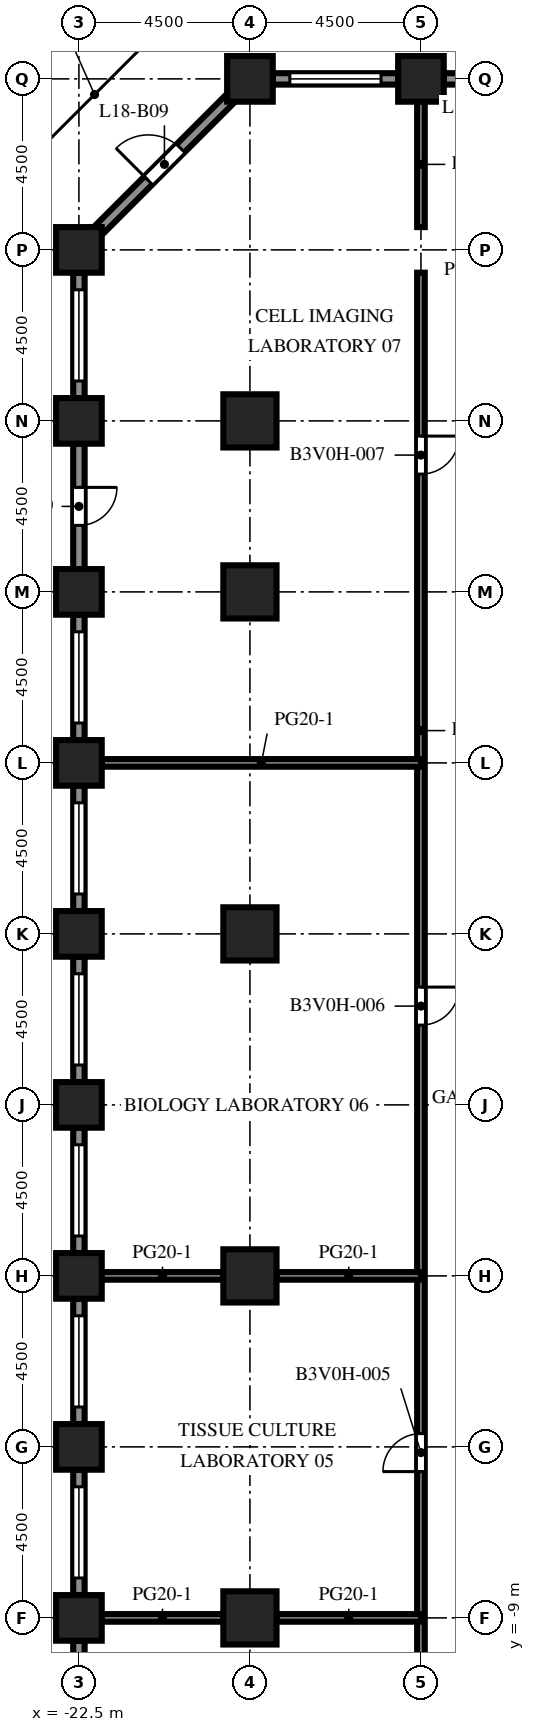
"""IFC4 building model, lengths in metres.
Left out: names, types, materials, properties, quantities, classifications, styles, units other than length and angle.
Written with IfcOpenShell. Run it as: python <this file> out.ifc"""

import sys

from ifc_helpers import new_model, si_unit, direction, frame, frame_2d, origin, origin_2d, place, context, subcontext, project, spatial, rectangle, extrude, element, fill, save


model = new_model("IFC4")
c1 = context("Model", 3, precision=1e-05, world=origin(), true_north=direction((0.0, 1.0)))
c2 = subcontext(c1, "Body", "Model", "MODEL_VIEW")
j1 = project(units=[si_unit("LENGTHUNIT", "METRE"), si_unit("PLANEANGLEUNIT", "RADIAN")], contexts=[c1])
p1 = place(None, origin())
s1 = spatial("IfcSite", under=j1, at=p1, CompositionType="ELEMENT")
p2 = place(p1, origin())
s2 = spatial("IfcBuilding", under=s1, at=p2, CompositionType="ELEMENT")
p3 = place(p2, frame((0.0, 0.0, 82.0)))
s3 = spatial("IfcBuildingStorey", under=s2, at=p3, CompositionType="ELEMENT", Elevation=82.0)
for number, where, z_axis, x_axis in (
    (1, (-22.5, -9.0, 0.0), (0.0, 0.0, 1.0), (1.0, 0.0, 0.0)),
    (2, (-22.5, -4.5, 0.0), (0.0, 0.0, 1.0), (1.0, 0.0, 0.0)),
    (3, (-22.5, 0.0, 0.0), (0.0, 0.0, 1.0), (1.0, 0.0, 0.0)),
    (4, (-22.5, 4.5, 0.0), (0.0, 0.0, 1.0), (1.0, 0.0, 0.0)),
    (5, (-22.5, 9.0, 0.0), (0.0, 0.0, 1.0), (1.0, 0.0, 0.0)),
    (6, (-22.5, 13.5, 0.0), (0.0, 0.0, 1.0), (1.0, 0.0, 0.0)),
    (7, (-22.5, 18.0, 0.0), (0.0, 0.0, 1.0), (1.0, 0.0, 0.0)),
    (8, (-22.5, 22.5, 0.0), (0.0, 0.0, 1.0), (1.0, 0.0, 0.0)),
    (9, (-22.5, 27.0, 0.0), (0.0, 0.0, 1.0), (1.0, 0.0, 0.0)),
):
    element("IfcColumn", number, at=place(p3, frame(where, z_axis=z_axis, x_axis=x_axis)), inside=s3, PredefinedType="COLUMN", context=c2, shape_type="SweptSolid", body=[
        extrude(rectangle(XDim=1.2, YDim=1.2, at=origin_2d()), origin(), (0.0, 0.0, 1.0), 4.1),
    ])
for number, where, z_axis, x_axis in (
    (10, (-18.0, 31.5, -0.45), (0.0, 0.0, 1.0), (1.0, 0.0, 0.0)),
    (11, (-13.5, 31.5, -0.45), (0.0, 0.0, 1.0), (1.0, 0.0, 0.0)),
):
    element("IfcColumn", number, at=place(p3, frame(where, z_axis=z_axis, x_axis=x_axis)), inside=s3, PredefinedType="COLUMN", context=c2, shape_type="SweptSolid", body=[
        extrude(rectangle(XDim=1.2, YDim=1.2, at=origin_2d()), origin(), (0.0, 0.0, 1.0), 4.55),
    ])
for number, where, z_axis, x_axis in (
    (12, (-18.0, -9.0, 0.0), (0.0, 0.0, 1.0), (1.0, 0.0, 0.0)),
    (13, (-18.0, 0.0, 0.0), (0.0, 0.0, 1.0), (1.0, 0.0, 0.0)),
    (14, (-18.0, 9.0, 0.0), (0.0, 0.0, 1.0), (1.0, 0.0, 0.0)),
):
    element("IfcColumn", number, at=place(p3, frame(where, z_axis=z_axis, x_axis=x_axis)), inside=s3, PredefinedType="COLUMN", context=c2, shape_type="SweptSolid", body=[
        extrude(rectangle(XDim=1.4, YDim=1.4, at=origin_2d()), origin(), (0.0, 0.0, 1.0), 4.1),
    ])
for number, where, z_axis, x_axis in (
    (15, (-18.0, 18.0, -0.45), (0.0, 0.0, 1.0), (1.0, 0.0, 0.0)),
    (16, (-18.0, 22.5, -0.45), (0.0, 0.0, 1.0), (1.0, 0.0, 0.0)),
):
    element("IfcColumn", number, at=place(p3, frame(where, z_axis=z_axis, x_axis=x_axis)), inside=s3, PredefinedType="COLUMN", context=c2, shape_type="SweptSolid", body=[
        extrude(rectangle(XDim=1.4, YDim=1.4, at=origin_2d()), origin(), (0.0, 0.0, 1.0), 4.55),
    ])
p4 = place(p3, frame((-12.9, 31.5, 0.0), z_axis=(0.0, 0.0, 1.0), x_axis=(1.0, 0.0, 0.0)))
e17 = element("IfcWall", 17, at=p4, inside=s3, PredefinedType="SOLIDWALL", context=c2, shape_type="SweptSolid", body=[
    extrude(rectangle(XDim=3.3, YDim=0.3, at=frame_2d((1.65, 0.0))), origin(), (0.0, 0.0, 1.0), 2.75),
])
p5 = place(p4, frame((1.15, 0.0, 0.0)))
e18 = element("IfcOpeningElement", 18, at=p5, cuts=e17, PredefinedType="OPENING", context=c2, shape_type="SweptSolid", body=[
    extrude(rectangle(XDim=1.0, YDim=2.2, at=frame_2d((0.5, 1.1))), frame((0.0, 0.16, 0.0), z_axis=(0.0, -1.0, 0.0), x_axis=(1.0, 0.0, 0.0)), (0.0, 0.0, 1.0), 0.32),
])
p6 = place(p3, frame((-17.4, 31.5, 0.0), z_axis=(0.0, 0.0, 1.0), x_axis=(1.0, 0.0, 0.0)))
e19 = element("IfcWall", 19, at=p6, inside=s3, PredefinedType="SOLIDWALL", context=c2, shape_type="SweptSolid", body=[
    extrude(rectangle(XDim=3.3, YDim=0.3, at=frame_2d((1.65, 0.0))), origin(), (0.0, 0.0, 1.0), 2.75),
])
p7 = place(p6, frame((0.45, 0.0, 0.8)))
e20 = element("IfcOpeningElement", 20, at=p7, cuts=e19, PredefinedType="OPENING", context=c2, shape_type="SweptSolid", body=[
    extrude(rectangle(XDim=2.4, YDim=1.7, at=frame_2d((1.2, 0.85))), frame((0.0, 0.16, 0.0), z_axis=(0.0, -1.0, 0.0), x_axis=(1.0, 0.0, 0.0)), (0.0, 0.0, 1.0), 0.32),
])
p8 = place(p3, frame((-22.006, 27.494, 0.0), z_axis=(0.0, 0.0, 1.0), x_axis=(0.707106781187, 0.707106781187, 0.0)))
e21 = element("IfcWall", 21, at=p8, inside=s3, PredefinedType="SOLIDWALL", context=c2, shape_type="SweptSolid", body=[
    extrude(rectangle(XDim=4.967, YDim=0.3, at=frame_2d((2.483, 0.0))), origin(), (0.0, 0.0, 1.0), 2.75),
])
p9 = place(p8, frame((1.884, 0.0, 0.0)))
e22 = element("IfcOpeningElement", 22, at=p9, cuts=e21, PredefinedType="OPENING", context=c2, shape_type="SweptSolid", body=[
    extrude(rectangle(XDim=1.2, YDim=2.2, at=frame_2d((0.6, 1.1))), frame((0.0, 0.16, 0.0), z_axis=(0.0, -1.0, 0.0), x_axis=(1.0, 0.0, 0.0)), (0.0, 0.0, 1.0), 0.32),
])
p10 = place(p3, frame((-22.5, 23.1, 0.0), z_axis=(0.0, 0.0, 1.0), x_axis=(0.0, 1.0, 0.0)))
e23 = element("IfcWall", 23, at=p10, inside=s3, PredefinedType="SOLIDWALL", context=c2, shape_type="SweptSolid", body=[
    extrude(rectangle(XDim=3.3, YDim=0.3, at=frame_2d((1.65, 0.0))), origin(), (0.0, 0.0, 1.0), 2.75),
])
p11 = place(p10, frame((0.45, 0.0, 0.8)))
e24 = element("IfcOpeningElement", 24, at=p11, cuts=e23, PredefinedType="OPENING", context=c2, shape_type="SweptSolid", body=[
    extrude(rectangle(XDim=2.4, YDim=1.7, at=frame_2d((1.2, 0.85))), frame((0.0, 0.16, 0.0), z_axis=(0.0, -1.0, 0.0), x_axis=(1.0, 0.0, 0.0)), (0.0, 0.0, 1.0), 0.32),
])
p12 = place(p3, frame((-22.5, 18.6, 0.0), z_axis=(0.0, 0.0, 1.0), x_axis=(0.0, 1.0, 0.0)))
e25 = element("IfcWall", 25, at=p12, inside=s3, PredefinedType="SOLIDWALL", context=c2, shape_type="SweptSolid", body=[
    extrude(rectangle(XDim=3.3, YDim=0.3, at=frame_2d((1.65, 0.0))), origin(), (0.0, 0.0, 1.0), 2.75),
])
p13 = place(p12, frame((1.15, 0.0, 0.0)))
e26 = element("IfcOpeningElement", 26, at=p13, cuts=e25, PredefinedType="OPENING", context=c2, shape_type="SweptSolid", body=[
    extrude(rectangle(XDim=1.0, YDim=2.2, at=frame_2d((0.5, 1.1))), frame((0.0, 0.16, 0.0), z_axis=(0.0, -1.0, 0.0), x_axis=(1.0, 0.0, 0.0)), (0.0, 0.0, 1.0), 0.32),
])
p14 = place(p3, frame((-22.5, 14.1, 0.0), z_axis=(0.0, 0.0, 1.0), x_axis=(0.0, 1.0, 0.0)))
e27 = element("IfcWall", 27, at=p14, inside=s3, PredefinedType="SOLIDWALL", context=c2, shape_type="SweptSolid", body=[
    extrude(rectangle(XDim=3.3, YDim=0.3, at=frame_2d((1.65, 0.0))), origin(), (0.0, 0.0, 1.0), 2.75),
])
p15 = place(p14, frame((0.45, 0.0, 0.8)))
e28 = element("IfcOpeningElement", 28, at=p15, cuts=e27, PredefinedType="OPENING", context=c2, shape_type="SweptSolid", body=[
    extrude(rectangle(XDim=2.4, YDim=1.7, at=frame_2d((1.2, 0.85))), frame((0.0, 0.16, 0.0), z_axis=(0.0, -1.0, 0.0), x_axis=(1.0, 0.0, 0.0)), (0.0, 0.0, 1.0), 0.32),
])
p16 = place(p3, frame((-22.5, 9.6, 0.0), z_axis=(0.0, 0.0, 1.0), x_axis=(0.0, 1.0, 0.0)))
e29 = element("IfcWall", 29, at=p16, inside=s3, PredefinedType="SOLIDWALL", context=c2, shape_type="SweptSolid", body=[
    extrude(rectangle(XDim=3.3, YDim=0.3, at=frame_2d((1.65, 0.0))), origin(), (0.0, 0.0, 1.0), 2.75),
])
p17 = place(p16, frame((0.45, 0.0, 0.8)))
e30 = element("IfcOpeningElement", 30, at=p17, cuts=e29, PredefinedType="OPENING", context=c2, shape_type="SweptSolid", body=[
    extrude(rectangle(XDim=2.4, YDim=1.7, at=frame_2d((1.2, 0.85))), frame((0.0, 0.16, 0.0), z_axis=(0.0, -1.0, 0.0), x_axis=(1.0, 0.0, 0.0)), (0.0, 0.0, 1.0), 0.32),
])
p18 = place(p3, frame((-22.5, 5.1, 0.0), z_axis=(0.0, 0.0, 1.0), x_axis=(0.0, 1.0, 0.0)))
e31 = element("IfcWall", 31, at=p18, inside=s3, PredefinedType="SOLIDWALL", context=c2, shape_type="SweptSolid", body=[
    extrude(rectangle(XDim=3.3, YDim=0.3, at=frame_2d((1.65, 0.0))), origin(), (0.0, 0.0, 1.0), 2.75),
])
p19 = place(p18, frame((0.45, 0.0, 0.8)))
e32 = element("IfcOpeningElement", 32, at=p19, cuts=e31, PredefinedType="OPENING", context=c2, shape_type="SweptSolid", body=[
    extrude(rectangle(XDim=2.4, YDim=1.7, at=frame_2d((1.2, 0.85))), frame((0.0, 0.16, 0.0), z_axis=(0.0, -1.0, 0.0), x_axis=(1.0, 0.0, 0.0)), (0.0, 0.0, 1.0), 0.32),
])
p20 = place(p3, frame((-22.5, 0.6, 0.0), z_axis=(0.0, 0.0, 1.0), x_axis=(0.0, 1.0, 0.0)))
e33 = element("IfcWall", 33, at=p20, inside=s3, PredefinedType="SOLIDWALL", context=c2, shape_type="SweptSolid", body=[
    extrude(rectangle(XDim=3.3, YDim=0.3, at=frame_2d((1.65, 0.0))), origin(), (0.0, 0.0, 1.0), 2.75),
])
p21 = place(p20, frame((0.45, 0.0, 0.8)))
e34 = element("IfcOpeningElement", 34, at=p21, cuts=e33, PredefinedType="OPENING", context=c2, shape_type="SweptSolid", body=[
    extrude(rectangle(XDim=2.4, YDim=1.7, at=frame_2d((1.2, 0.85))), frame((0.0, 0.16, 0.0), z_axis=(0.0, -1.0, 0.0), x_axis=(1.0, 0.0, 0.0)), (0.0, 0.0, 1.0), 0.32),
])
p22 = place(p3, frame((-22.5, -3.9, 0.0), z_axis=(0.0, 0.0, 1.0), x_axis=(0.0, 1.0, 0.0)))
e35 = element("IfcWall", 35, at=p22, inside=s3, PredefinedType="SOLIDWALL", context=c2, shape_type="SweptSolid", body=[
    extrude(rectangle(XDim=3.3, YDim=0.3, at=frame_2d((1.65, 0.0))), origin(), (0.0, 0.0, 1.0), 2.75),
])
p23 = place(p22, frame((0.45, 0.0, 0.8)))
e36 = element("IfcOpeningElement", 36, at=p23, cuts=e35, PredefinedType="OPENING", context=c2, shape_type="SweptSolid", body=[
    extrude(rectangle(XDim=2.4, YDim=1.7, at=frame_2d((1.2, 0.85))), frame((0.0, 0.16, 0.0), z_axis=(0.0, -1.0, 0.0), x_axis=(1.0, 0.0, 0.0)), (0.0, 0.0, 1.0), 0.32),
])
p24 = place(p3, frame((-22.5, -8.4, 0.0), z_axis=(0.0, 0.0, 1.0), x_axis=(0.0, 1.0, 0.0)))
e37 = element("IfcWall", 37, at=p24, inside=s3, PredefinedType="SOLIDWALL", context=c2, shape_type="SweptSolid", body=[
    extrude(rectangle(XDim=3.3, YDim=0.3, at=frame_2d((1.65, 0.0))), origin(), (0.0, 0.0, 1.0), 2.75),
])
p25 = place(p24, frame((0.45, 0.0, 0.8)))
e38 = element("IfcOpeningElement", 38, at=p25, cuts=e37, PredefinedType="OPENING", context=c2, shape_type="SweptSolid", body=[
    extrude(rectangle(XDim=2.4, YDim=1.7, at=frame_2d((1.2, 0.85))), frame((0.0, 0.16, 0.0), z_axis=(0.0, -1.0, 0.0), x_axis=(1.0, 0.0, 0.0)), (0.0, 0.0, 1.0), 0.32),
])
p26 = place(p3, frame((-22.5, -12.9, 0.0), z_axis=(0.0, 0.0, 1.0), x_axis=(0.0, 1.0, 0.0)))
e39 = element("IfcWall", 39, at=p26, inside=s3, PredefinedType="SOLIDWALL", context=c2, shape_type="SweptSolid", body=[
    extrude(rectangle(XDim=3.3, YDim=0.3, at=frame_2d((1.65, 0.0))), origin(), (0.0, 0.0, 1.0), 2.75),
])
p27 = place(p26, frame((1.15, 0.0, 0.0)))
e40 = element("IfcOpeningElement", 40, at=p27, cuts=e39, PredefinedType="OPENING", context=c2, shape_type="SweptSolid", body=[
    extrude(rectangle(XDim=1.0, YDim=2.2, at=frame_2d((0.5, 1.1))), frame((0.0, 0.16, 0.0), z_axis=(0.0, -1.0, 0.0), x_axis=(1.0, 0.0, 0.0)), (0.0, 0.0, 1.0), 0.32),
])
p28 = place(p3, frame((-13.5, -21.9, 0.0), z_axis=(0.0, 0.0, 1.0), x_axis=(0.0, 1.0, 0.0)))
e41 = element("IfcWall", 41, at=p28, inside=s3, PredefinedType="PARTITIONING", context=c2, shape_type="SweptSolid", body=[
    extrude(rectangle(XDim=48.3, YDim=0.2, at=frame_2d((24.15, 0.0))), origin(), (0.0, 0.0, 1.0), 3.65),
])
p29 = place(p28, frame((5.0, 0.0, 0.0)))
e42 = element("IfcOpeningElement", 42, at=p29, cuts=e41, PredefinedType="OPENING", context=c2, shape_type="SweptSolid", body=[
    extrude(rectangle(XDim=1.0, YDim=2.1, at=frame_2d((0.5, 1.05))), frame((0.0, 0.11, 0.0), z_axis=(0.0, -1.0, 0.0), x_axis=(1.0, 0.0, 0.0)), (0.0, 0.0, 1.0), 0.22),
])
p30 = place(p28, frame((16.75, 0.0, 0.0)))
e43 = element("IfcOpeningElement", 43, at=p30, cuts=e41, PredefinedType="OPENING", context=c2, shape_type="SweptSolid", body=[
    extrude(rectangle(XDim=1.0, YDim=2.1, at=frame_2d((0.5, 1.05))), frame((0.0, 0.11, 0.0), z_axis=(0.0, -1.0, 0.0), x_axis=(1.0, 0.0, 0.0)), (0.0, 0.0, 1.0), 0.22),
])
p31 = place(p28, frame((28.5, 0.0, 0.0)))
e44 = element("IfcOpeningElement", 44, at=p31, cuts=e41, PredefinedType="OPENING", context=c2, shape_type="SweptSolid", body=[
    extrude(rectangle(XDim=1.0, YDim=2.1, at=frame_2d((0.5, 1.05))), frame((0.0, 0.11, 0.0), z_axis=(0.0, -1.0, 0.0), x_axis=(1.0, 0.0, 0.0)), (0.0, 0.0, 1.0), 0.22),
])
p32 = place(p28, frame((43.0, 0.0, 0.0)))
e45 = element("IfcOpeningElement", 45, at=p32, cuts=e41, PredefinedType="OPENING", context=c2, shape_type="SweptSolid", body=[
    extrude(rectangle(XDim=1.0, YDim=2.1, at=frame_2d((0.5, 1.05))), frame((0.0, 0.11, 0.0), z_axis=(0.0, -1.0, 0.0), x_axis=(1.0, 0.0, 0.0)), (0.0, 0.0, 1.0), 0.22),
])
p33 = place(p3, frame((-13.5, 27.6, 0.0), z_axis=(0.0, 0.0, 1.0), x_axis=(0.0, 1.0, 0.0)))
e46 = element("IfcWall", 46, at=p33, inside=s3, PredefinedType="PARTITIONING", context=c2, shape_type="SweptSolid", body=[
    extrude(rectangle(XDim=3.3, YDim=0.2, at=frame_2d((1.65, 0.0))), origin(), (0.0, 0.0, 1.0), 3.65),
])
p34 = place(p3, frame((-21.9, -9.0, 0.0), z_axis=(0.0, 0.0, 1.0), x_axis=(1.0, 0.0, 0.0)))
e47 = element("IfcWall", 47, at=p34, inside=s3, PredefinedType="PARTITIONING", context=c2, shape_type="SweptSolid", body=[
    extrude(rectangle(XDim=3.2, YDim=0.2, at=frame_2d((1.6, 0.0))), origin(), (0.0, 0.0, 1.0), 3.65),
])
p35 = place(p3, frame((-17.3, -9.0, 0.0), z_axis=(0.0, 0.0, 1.0), x_axis=(1.0, 0.0, 0.0)))
e48 = element("IfcWall", 48, at=p35, inside=s3, PredefinedType="PARTITIONING", context=c2, shape_type="SweptSolid", body=[
    extrude(rectangle(XDim=3.8, YDim=0.2, at=frame_2d((1.9, 0.0))), origin(), (0.0, 0.0, 1.0), 3.65),
])
p36 = place(p3, frame((-21.9, 0.0, 0.0), z_axis=(0.0, 0.0, 1.0), x_axis=(1.0, 0.0, 0.0)))
e49 = element("IfcWall", 49, at=p36, inside=s3, PredefinedType="PARTITIONING", context=c2, shape_type="SweptSolid", body=[
    extrude(rectangle(XDim=3.2, YDim=0.2, at=frame_2d((1.6, 0.0))), origin(), (0.0, 0.0, 1.0), 3.65),
])
p37 = place(p3, frame((-17.3, 0.0, 0.0), z_axis=(0.0, 0.0, 1.0), x_axis=(1.0, 0.0, 0.0)))
e50 = element("IfcWall", 50, at=p37, inside=s3, PredefinedType="PARTITIONING", context=c2, shape_type="SweptSolid", body=[
    extrude(rectangle(XDim=3.8, YDim=0.2, at=frame_2d((1.9, 0.0))), origin(), (0.0, 0.0, 1.0), 3.65),
])
p38 = place(p3, frame((-21.9, 13.5, 0.0), z_axis=(0.0, 0.0, 1.0), x_axis=(1.0, 0.0, 0.0)))
e51 = element("IfcWall", 51, at=p38, inside=s3, PredefinedType="PARTITIONING", context=c2, shape_type="SweptSolid", body=[
    extrude(rectangle(XDim=8.4, YDim=0.2, at=frame_2d((4.2, 0.0))), origin(), (0.0, 0.0, 1.0), 3.65),
])
p39 = place(p7, origin())
e52 = element("IfcWindow", 52, at=p39, inside=s3, PartitioningType="SINGLE_PANEL", PredefinedType="WINDOW", context=c2, shape_type="SweptSolid", body=[
    extrude(rectangle(XDim=2.4, YDim=1.7, at=frame_2d((1.2, 0.85))), frame((0.0, 0.03, 0.0), z_axis=(0.0, -1.0, 0.0), x_axis=(1.0, 0.0, 0.0)), (0.0, 0.0, 1.0), 0.06),
])
fill(e20, e52)
p40 = place(p9, origin())
e53 = element("IfcDoor", 53, at=p40, inside=s3, OperationType="SINGLE_SWING_LEFT", PredefinedType="DOOR", context=c2, shape_type="SweptSolid", body=[
    extrude(rectangle(XDim=1.2, YDim=2.2, at=frame_2d((0.6, 1.1))), frame((0.0, 0.025, 0.0), z_axis=(0.0, -1.0, 0.0), x_axis=(1.0, 0.0, 0.0)), (0.0, 0.0, 1.0), 0.05),
])
fill(e22, e53)
p41 = place(p11, origin())
e54 = element("IfcWindow", 54, at=p41, inside=s3, PartitioningType="SINGLE_PANEL", PredefinedType="WINDOW", context=c2, shape_type="SweptSolid", body=[
    extrude(rectangle(XDim=2.4, YDim=1.7, at=frame_2d((1.2, 0.85))), frame((0.0, 0.03, 0.0), z_axis=(0.0, -1.0, 0.0), x_axis=(1.0, 0.0, 0.0)), (0.0, 0.0, 1.0), 0.06),
])
fill(e24, e54)
p42 = place(p13, origin())
e55 = element("IfcDoor", 55, at=p42, inside=s3, OperationType="SINGLE_SWING_RIGHT", PredefinedType="DOOR", context=c2, shape_type="SweptSolid", body=[
    extrude(rectangle(XDim=1.0, YDim=2.2, at=frame_2d((0.5, 1.1))), frame((0.0, 0.025, 0.0), z_axis=(0.0, -1.0, 0.0), x_axis=(1.0, 0.0, 0.0)), (0.0, 0.0, 1.0), 0.05),
])
fill(e26, e55)
p43 = place(p15, origin())
e56 = element("IfcWindow", 56, at=p43, inside=s3, PartitioningType="SINGLE_PANEL", PredefinedType="WINDOW", context=c2, shape_type="SweptSolid", body=[
    extrude(rectangle(XDim=2.4, YDim=1.7, at=frame_2d((1.2, 0.85))), frame((0.0, 0.03, 0.0), z_axis=(0.0, -1.0, 0.0), x_axis=(1.0, 0.0, 0.0)), (0.0, 0.0, 1.0), 0.06),
])
fill(e28, e56)
p44 = place(p17, origin())
e57 = element("IfcWindow", 57, at=p44, inside=s3, PartitioningType="SINGLE_PANEL", PredefinedType="WINDOW", context=c2, shape_type="SweptSolid", body=[
    extrude(rectangle(XDim=2.4, YDim=1.7, at=frame_2d((1.2, 0.85))), frame((0.0, 0.03, 0.0), z_axis=(0.0, -1.0, 0.0), x_axis=(1.0, 0.0, 0.0)), (0.0, 0.0, 1.0), 0.06),
])
fill(e30, e57)
p45 = place(p19, origin())
e58 = element("IfcWindow", 58, at=p45, inside=s3, PartitioningType="SINGLE_PANEL", PredefinedType="WINDOW", context=c2, shape_type="SweptSolid", body=[
    extrude(rectangle(XDim=2.4, YDim=1.7, at=frame_2d((1.2, 0.85))), frame((0.0, 0.03, 0.0), z_axis=(0.0, -1.0, 0.0), x_axis=(1.0, 0.0, 0.0)), (0.0, 0.0, 1.0), 0.06),
])
fill(e32, e58)
p46 = place(p21, origin())
e59 = element("IfcWindow", 59, at=p46, inside=s3, PartitioningType="SINGLE_PANEL", PredefinedType="WINDOW", context=c2, shape_type="SweptSolid", body=[
    extrude(rectangle(XDim=2.4, YDim=1.7, at=frame_2d((1.2, 0.85))), frame((0.0, 0.03, 0.0), z_axis=(0.0, -1.0, 0.0), x_axis=(1.0, 0.0, 0.0)), (0.0, 0.0, 1.0), 0.06),
])
fill(e34, e59)
p47 = place(p23, origin())
e60 = element("IfcWindow", 60, at=p47, inside=s3, PartitioningType="SINGLE_PANEL", PredefinedType="WINDOW", context=c2, shape_type="SweptSolid", body=[
    extrude(rectangle(XDim=2.4, YDim=1.7, at=frame_2d((1.2, 0.85))), frame((0.0, 0.03, 0.0), z_axis=(0.0, -1.0, 0.0), x_axis=(1.0, 0.0, 0.0)), (0.0, 0.0, 1.0), 0.06),
])
fill(e36, e60)
p48 = place(p25, origin())
e61 = element("IfcWindow", 61, at=p48, inside=s3, PartitioningType="SINGLE_PANEL", PredefinedType="WINDOW", context=c2, shape_type="SweptSolid", body=[
    extrude(rectangle(XDim=2.4, YDim=1.7, at=frame_2d((1.2, 0.85))), frame((0.0, 0.03, 0.0), z_axis=(0.0, -1.0, 0.0), x_axis=(1.0, 0.0, 0.0)), (0.0, 0.0, 1.0), 0.06),
])
fill(e38, e61)
p49 = place(p30, origin())
e62 = element("IfcDoor", 62, at=p49, inside=s3, OperationType="SINGLE_SWING_LEFT", PredefinedType="DOOR", context=c2, shape_type="SweptSolid", body=[
    extrude(rectangle(XDim=1.0, YDim=2.1, at=frame_2d((0.5, 1.05))), frame((0.0, 0.025, 0.0), z_axis=(0.0, -1.0, 0.0), x_axis=(1.0, 0.0, 0.0)), (0.0, 0.0, 1.0), 0.05),
])
fill(e43, e62)
p50 = place(p31, origin())
e63 = element("IfcDoor", 63, at=p50, inside=s3, OperationType="SINGLE_SWING_RIGHT", PredefinedType="DOOR", context=c2, shape_type="SweptSolid", body=[
    extrude(rectangle(XDim=1.0, YDim=2.1, at=frame_2d((0.5, 1.05))), frame((0.0, 0.025, 0.0), z_axis=(0.0, -1.0, 0.0), x_axis=(1.0, 0.0, 0.0)), (0.0, 0.0, 1.0), 0.05),
])
fill(e44, e63)
p51 = place(p32, origin())
e64 = element("IfcDoor", 64, at=p51, inside=s3, OperationType="SINGLE_SWING_RIGHT", PredefinedType="DOOR", context=c2, shape_type="SweptSolid", body=[
    extrude(rectangle(XDim=1.0, YDim=2.1, at=frame_2d((0.5, 1.05))), frame((0.0, 0.025, 0.0), z_axis=(0.0, -1.0, 0.0), x_axis=(1.0, 0.0, 0.0)), (0.0, 0.0, 1.0), 0.05),
])
fill(e45, e64)
save(model, sys.argv[1])
